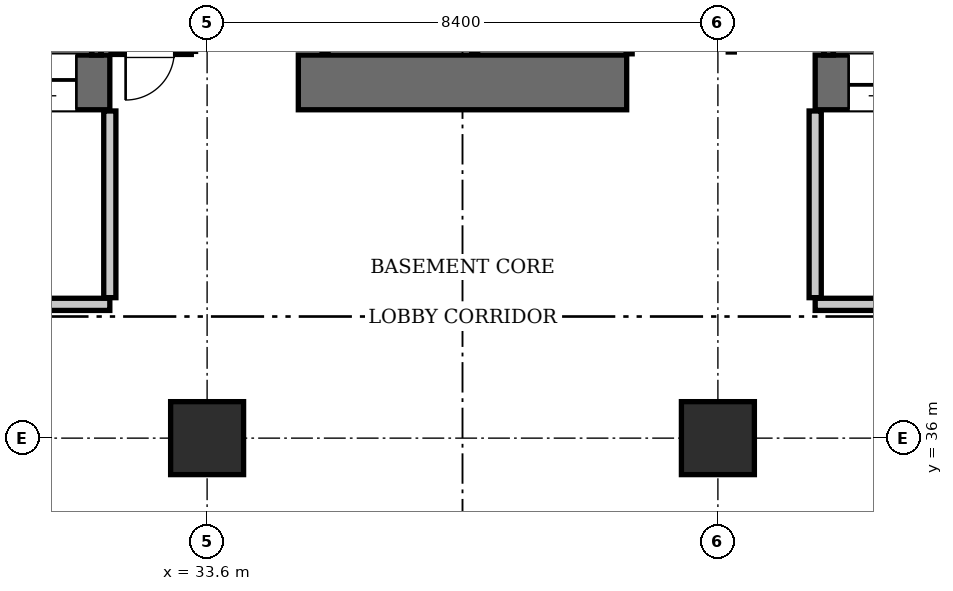
"""IFC4 building model, lengths in metres.
Left out: names, types, materials, properties, quantities, classifications, styles, units other than length and angle.
Written with IfcOpenShell. Run it as: python <this file> out.ifc"""

import sys

from ifc_helpers import new_model, si_unit, direction, frame, frame_2d, origin, origin_2d, place, context, subcontext, project, spatial, rectangle, extrude, element, fill, save


model = new_model("IFC4")
c1 = context("Model", 3, precision=1e-05, world=origin(), true_north=direction((0.0, 1.0)))
c2 = subcontext(c1, "Body", "Model", "MODEL_VIEW")
j1 = project(units=[si_unit("LENGTHUNIT", "METRE"), si_unit("PLANEANGLEUNIT", "RADIAN")], contexts=[c1])
p1 = place(None, origin())
s1 = spatial("IfcSite", under=j1, at=p1, CompositionType="ELEMENT")
p2 = place(p1, origin())
s2 = spatial("IfcBuilding", under=s1, at=p2, CompositionType="ELEMENT")
p3 = place(p2, frame((0.0, 0.0, -5.25)))
s3 = spatial("IfcBuildingStorey", under=s2, at=p3, CompositionType="ELEMENT", Elevation=-5.25)
p4 = place(p3, frame((25.2, 41.85, 0.0), z_axis=(0.0, 0.0, 1.0), x_axis=(1.0, 0.0, 0.0)))
e1 = element("IfcWall", 1, at=p4, inside=s3, PredefinedType="SHEAR", context=c2, shape_type="SweptSolid", body=[
    extrude(rectangle(XDim=6.8, YDim=0.9, at=frame_2d((3.4, 0.0))), origin(), (0.0, 0.0, 1.0), 5.25),
])
p5 = place(p4, frame((1.65, 0.0, 0.0)))
e2 = element("IfcOpeningElement", 2, at=p5, cuts=e1, PredefinedType="OPENING", context=c2, shape_type="SweptSolid", body=[
    extrude(rectangle(XDim=1.15, YDim=2.15, at=frame_2d((0.575, 1.075))), frame((0.0, 0.46, 0.0), z_axis=(0.0, -1.0, 0.0), x_axis=(1.0, 0.0, 0.0)), (0.0, 0.0, 1.0), 0.92),
])
p6 = place(p4, frame((5.15, 0.0, 0.0)))
e3 = element("IfcOpeningElement", 3, at=p6, cuts=e1, PredefinedType="OPENING", context=c2, shape_type="SweptSolid", body=[
    extrude(rectangle(XDim=1.1, YDim=2.2, at=frame_2d((0.55, 1.1))), frame((0.0, 0.46, 0.0), z_axis=(0.0, -1.0, 0.0), x_axis=(1.0, 0.0, 0.0)), (0.0, 0.0, 1.0), 0.92),
])
p7 = place(p3, frame((35.1, 41.85, 0.0), z_axis=(0.0, 0.0, 1.0), x_axis=(1.0, 0.0, 0.0)))
e4 = element("IfcWall", 4, at=p7, inside=s3, PredefinedType="SHEAR", context=c2, shape_type="SweptSolid", body=[
    extrude(rectangle(XDim=5.4, YDim=0.9, at=frame_2d((2.7, 0.0))), origin(), (0.0, 0.0, 1.0), 5.25),
])
p8 = place(p3, frame((43.6, 41.85, 0.0), z_axis=(0.0, 0.0, 1.0), x_axis=(1.0, 0.0, 0.0)))
e5 = element("IfcWall", 5, at=p8, inside=s3, PredefinedType="SHEAR", context=c2, shape_type="SweptSolid", body=[
    extrude(rectangle(XDim=6.8, YDim=0.9, at=frame_2d((3.4, 0.0))), origin(), (0.0, 0.0, 1.0), 5.25),
])
p9 = place(p8, frame((3.9, 0.0, 0.0)))
e6 = element("IfcOpeningElement", 6, at=p9, cuts=e5, PredefinedType="OPENING", context=c2, shape_type="SweptSolid", body=[
    extrude(rectangle(XDim=1.15, YDim=2.15, at=frame_2d((0.575, 1.075))), frame((0.0, 0.46, 0.0), z_axis=(0.0, -1.0, 0.0), x_axis=(1.0, 0.0, 0.0)), (0.0, 0.0, 1.0), 0.92),
])
p10 = place(p8, frame((0.55, 0.0, 0.0)))
e7 = element("IfcOpeningElement", 7, at=p10, cuts=e5, PredefinedType="OPENING", context=c2, shape_type="SweptSolid", body=[
    extrude(rectangle(XDim=1.1, YDim=2.2, at=frame_2d((0.55, 1.1))), frame((0.0, 0.46, 0.0), z_axis=(0.0, -1.0, 0.0), x_axis=(1.0, 0.0, 0.0)), (0.0, 0.0, 1.0), 0.92),
])
for number, where, z_axis, x_axis in (
    (8, (33.6, 36.0, 0.0), (0.0, 0.0, 1.0), (1.0, 0.0, 0.0)),
    (9, (42.0, 36.0, 0.0), (0.0, 0.0, 1.0), (1.0, 0.0, 0.0)),
):
    element("IfcColumn", number, at=place(p3, frame(where, z_axis=z_axis, x_axis=x_axis)), inside=s3, PredefinedType="COLUMN", context=c2, shape_type="SweptSolid", body=[
        extrude(rectangle(XDim=1.2, YDim=1.2, at=origin_2d()), origin(), (0.0, 0.0, 1.0), 5.25),
    ])
for number, where, z_axis, x_axis in (
    (10, (31.78, 42.3, 0.0), (0.0, 0.0, 1.0), (0.0, 1.0, 0.0)),
    (11, (43.82, 42.3, 0.0), (0.0, 0.0, 1.0), (0.0, 1.0, 0.0)),
):
    element("IfcWall", number, at=place(p3, frame(where, z_axis=z_axis, x_axis=x_axis)), inside=s3, PredefinedType="SOLIDWALL", context=c2, shape_type="SweptSolid", body=[
        extrude(rectangle(XDim=2.44, YDim=0.16, at=frame_2d((1.22, 0.0))), origin(), (0.0, 0.0, 1.0), 4.97),
    ])
p11 = place(p3, frame((26.2, 38.2, 0.0), z_axis=(0.0, 0.0, 1.0), x_axis=(1.0, 0.0, 0.0)))
e12 = element("IfcWall", 12, at=p11, inside=s3, PredefinedType="PARTITIONING", context=c2, shape_type="SweptSolid", body=[
    extrude(rectangle(XDim=5.8, YDim=0.2, at=frame_2d((2.9, 0.0))), origin(), (0.0, 0.0, 1.0), 4.97),
])
p12 = place(p11, frame((2.3, 0.0, 0.0)))
e13 = element("IfcOpeningElement", 13, at=p12, cuts=e12, PredefinedType="OPENING", context=c2, shape_type="SweptSolid", body=[
    extrude(rectangle(XDim=1.15, YDim=2.15, at=frame_2d((0.575, 1.075))), frame((0.0, 0.11, 0.0), z_axis=(0.0, -1.0, 0.0), x_axis=(1.0, 0.0, 0.0)), (0.0, 0.0, 1.0), 0.22),
])
p13 = place(p3, frame((32.0, 38.31, 0.0), z_axis=(0.0, 0.0, 1.0), x_axis=(0.0, 1.0, 0.0)))
e14 = element("IfcWall", 14, at=p13, inside=s3, PredefinedType="PARTITIONING", context=c2, shape_type="SweptSolid", body=[
    extrude(rectangle(XDim=3.07, YDim=0.2, at=frame_2d((1.535, 0.0))), origin(), (0.0, 0.0, 1.0), 4.97),
])
p14 = place(p3, frame((43.6, 38.2, 0.0), z_axis=(0.0, 0.0, 1.0), x_axis=(1.0, 0.0, 0.0)))
e15 = element("IfcWall", 15, at=p14, inside=s3, PredefinedType="PARTITIONING", context=c2, shape_type="SweptSolid", body=[
    extrude(rectangle(XDim=5.8, YDim=0.2, at=frame_2d((2.9, 0.0))), origin(), (0.0, 0.0, 1.0), 4.97),
])
p15 = place(p14, frame((2.3, 0.0, 0.0)))
e16 = element("IfcOpeningElement", 16, at=p15, cuts=e15, PredefinedType="OPENING", context=c2, shape_type="SweptSolid", body=[
    extrude(rectangle(XDim=1.15, YDim=2.15, at=frame_2d((0.575, 1.075))), frame((0.0, 0.11, 0.0), z_axis=(0.0, -1.0, 0.0), x_axis=(1.0, 0.0, 0.0)), (0.0, 0.0, 1.0), 0.22),
])
p16 = place(p3, frame((43.6, 38.31, 0.0), z_axis=(0.0, 0.0, 1.0), x_axis=(0.0, 1.0, 0.0)))
e17 = element("IfcWall", 17, at=p16, inside=s3, PredefinedType="PARTITIONING", context=c2, shape_type="SweptSolid", body=[
    extrude(rectangle(XDim=3.07, YDim=0.2, at=frame_2d((1.535, 0.0))), origin(), (0.0, 0.0, 1.0), 4.97),
])
p17 = place(p3, frame((32.02, 42.36, 0.0), z_axis=(0.0, 0.0, 1.0), x_axis=(1.0, 0.0, 0.0)))
e18 = element("IfcWall", 18, at=p17, inside=s3, PredefinedType="PARTITIONING", context=c2, shape_type="SweptSolid", body=[
    extrude(rectangle(XDim=1.32, YDim=0.1, at=frame_2d((0.66, 0.0))), origin(), (0.0, 0.0, 1.0), 4.97),
])
p18 = place(p17, frame((0.24, 0.0, 0.0)))
e19 = element("IfcOpeningElement", 19, at=p18, cuts=e18, PredefinedType="OPENING", context=c2, shape_type="SweptSolid", body=[
    extrude(rectangle(XDim=0.8, YDim=2.05, at=frame_2d((0.4, 1.025))), frame((0.0, 0.06, 0.0), z_axis=(0.0, -1.0, 0.0), x_axis=(1.0, 0.0, 0.0)), (0.0, 0.0, 1.0), 0.12),
])
for number, where, z_axis, x_axis in (
    (20, (35.54, 42.32, 0.0), (0.0, 0.0, 1.0), (0.0, 1.0, 0.0)),
    (21, (40.54, 42.32, 0.0), (0.0, 0.0, 1.0), (0.0, 1.0, 0.0)),
):
    element("IfcWall", number, at=place(p3, frame(where, z_axis=z_axis, x_axis=x_axis)), inside=s3, PredefinedType="PARTITIONING", context=c2, shape_type="SweptSolid", body=[
        extrude(rectangle(XDim=2.04, YDim=0.1, at=frame_2d((1.02, 0.0))), origin(), (0.0, 0.0, 1.0), 4.97),
    ])
p19 = place(p3, frame((38.0, 42.35, 0.0), z_axis=(0.0, 0.0, 1.0), x_axis=(0.0, 1.0, 0.0)))
e22 = element("IfcWall", 22, at=p19, inside=s3, PredefinedType="PARTITIONING", context=c2, shape_type="SweptSolid", body=[
    extrude(rectangle(XDim=2.01, YDim=0.1, at=frame_2d((1.005, 0.0))), origin(), (0.0, 0.0, 1.0), 4.97),
])
p20 = place(p6, frame((1.1, 0.0, 0.0), z_axis=(0.0, 0.0, 1.0), x_axis=(-1.0, 0.0, 0.0)))
e23 = element("IfcDoor", 23, at=p20, inside=s3, OperationType="SLIDING_TO_LEFT", PredefinedType="DOOR", context=c2, shape_type="SweptSolid", body=[
    extrude(rectangle(XDim=1.1, YDim=2.2, at=frame_2d((0.55, 1.1))), frame((0.0, 0.025, 0.0), z_axis=(0.0, -1.0, 0.0), x_axis=(1.0, 0.0, 0.0)), (0.0, 0.0, 1.0), 0.05),
])
fill(e3, e23)
p21 = place(p10, frame((1.1, 0.0, 0.0), z_axis=(0.0, 0.0, 1.0), x_axis=(-1.0, 0.0, 0.0)))
e24 = element("IfcDoor", 24, at=p21, inside=s3, OperationType="SLIDING_TO_LEFT", PredefinedType="DOOR", context=c2, shape_type="SweptSolid", body=[
    extrude(rectangle(XDim=1.1, YDim=2.2, at=frame_2d((0.55, 1.1))), frame((0.0, 0.025, 0.0), z_axis=(0.0, -1.0, 0.0), x_axis=(1.0, 0.0, 0.0)), (0.0, 0.0, 1.0), 0.05),
])
fill(e7, e24)
p22 = place(p18, frame((0.8, 0.0, 0.0), z_axis=(0.0, 0.0, 1.0), x_axis=(-1.0, 0.0, 0.0)))
e25 = element("IfcDoor", 25, at=p22, inside=s3, OperationType="SINGLE_SWING_RIGHT", PredefinedType="DOOR", context=c2, shape_type="SweptSolid", body=[
    extrude(rectangle(XDim=0.8, YDim=2.05, at=frame_2d((0.4, 1.025))), frame((0.0, 0.025, 0.0), z_axis=(0.0, -1.0, 0.0), x_axis=(1.0, 0.0, 0.0)), (0.0, 0.0, 1.0), 0.05),
])
fill(e19, e25)
save(model, sys.argv[1])
